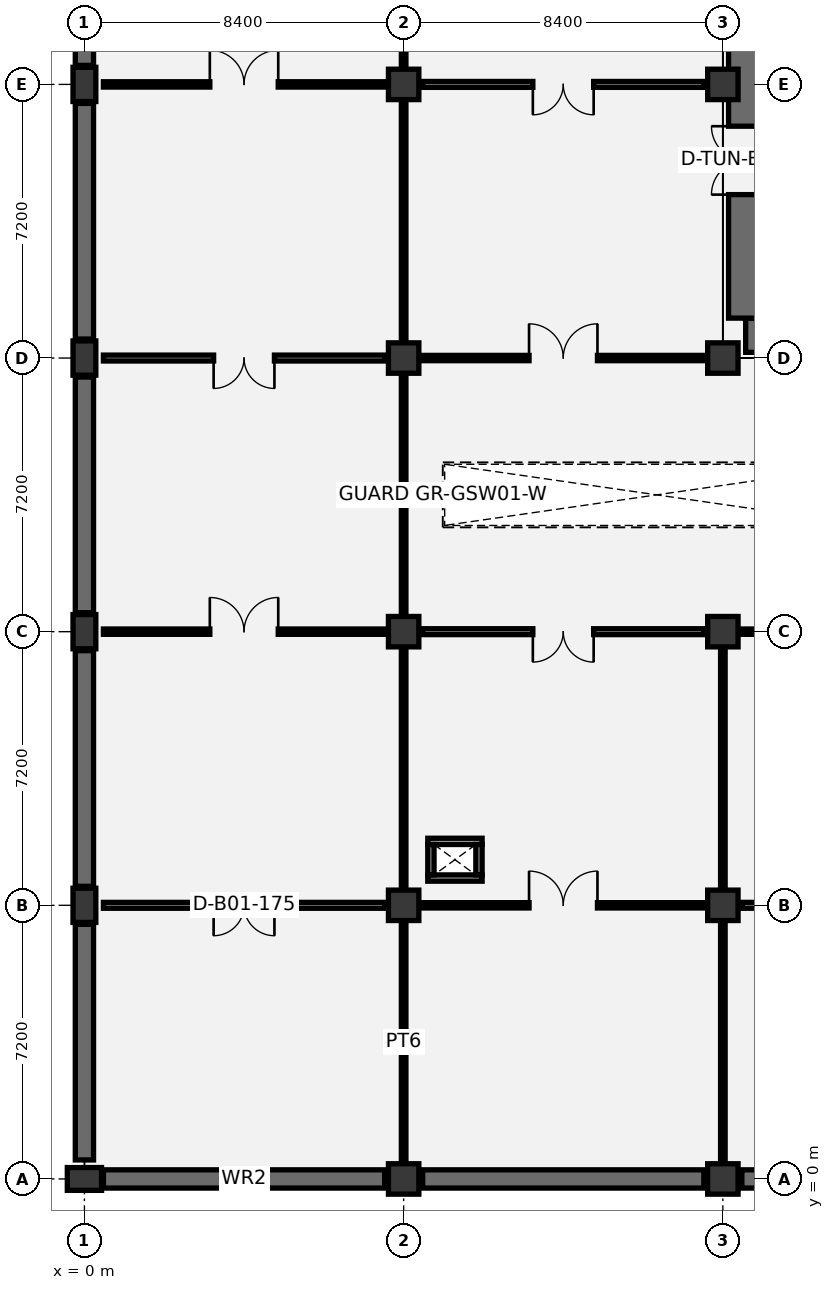
"""IFC4 building model, lengths in metres.
Left out: names, types, materials, properties, quantities, classifications, styles, units other than length and angle.
Written with IfcOpenShell. Run it as: python <this file> out.ifc"""

import sys

from ifc_helpers import new_model, si_unit, direction, frame, frame_2d, origin, origin_2d, place, context, subcontext, project, spatial, rectangle, extrude, element, fill, save


model = new_model("IFC4")
c1 = context("Model", 3, precision=1e-05, world=origin(), true_north=direction((0.0, 1.0)))
c2 = subcontext(c1, "Body", "Model", "MODEL_VIEW")
j1 = project(units=[si_unit("LENGTHUNIT", "METRE"), si_unit("PLANEANGLEUNIT", "RADIAN")], contexts=[c1])
p1 = place(None, origin())
s1 = spatial("IfcSite", under=j1, at=p1, CompositionType="ELEMENT")
p2 = place(p1, origin())
s2 = spatial("IfcBuilding", under=s1, at=p2, CompositionType="ELEMENT")
p3 = place(p2, frame((0.0, 0.0, -4.8)))
s3 = spatial("IfcBuildingStorey", under=s2, at=p3, CompositionType="ELEMENT", Elevation=-4.8)
for number, where, z_axis, x_axis in (
    (1, (0.0, 0.0, 0.0), (0.0, 0.0, 1.0), (0.0, 1.0, 0.0)),
    (2, (0.0, 7.2, 0.0), (0.0, 0.0, 1.0), (1.0, 0.0, 0.0)),
    (3, (0.0, 14.4, 0.0), (0.0, 0.0, 1.0), (1.0, 0.0, 0.0)),
    (4, (0.0, 21.6, 0.0), (0.0, 0.0, 1.0), (1.0, 0.0, 0.0)),
    (5, (0.0, 28.8, 0.0), (0.0, 0.0, 1.0), (1.0, 0.0, 0.0)),
):
    element("IfcColumn", number, at=place(p3, frame(where, z_axis=z_axis, x_axis=x_axis)), inside=s3, PredefinedType="COLUMN", context=c2, shape_type="SweptSolid", body=[
        extrude(rectangle(XDim=0.6, YDim=0.9, at=origin_2d()), origin(), (0.0, 0.0, 1.0), 4.8),
    ])
for number, where, z_axis, x_axis in (
    (6, (8.4, 0.0, 0.0), (0.0, 0.0, 1.0), (1.0, 0.0, 0.0)),
    (7, (8.4, 7.2, 0.0), (0.0, 0.0, 1.0), (1.0, 0.0, 0.0)),
    (8, (8.4, 14.4, 0.0), (0.0, 0.0, 1.0), (1.0, 0.0, 0.0)),
    (9, (8.4, 21.6, 0.0), (0.0, 0.0, 1.0), (1.0, 0.0, 0.0)),
    (10, (8.4, 28.8, 0.0), (0.0, 0.0, 1.0), (1.0, 0.0, 0.0)),
    (11, (16.8, 0.0, 0.0), (0.0, 0.0, 1.0), (1.0, 0.0, 0.0)),
    (12, (16.8, 7.2, 0.0), (0.0, 0.0, 1.0), (1.0, 0.0, 0.0)),
    (13, (16.8, 14.4, 0.0), (0.0, 0.0, 1.0), (1.0, 0.0, 0.0)),
    (14, (16.8, 21.6, 0.0), (0.0, 0.0, 1.0), (1.0, 0.0, 0.0)),
    (15, (16.8, 28.8, 0.0), (0.0, 0.0, 1.0), (1.0, 0.0, 0.0)),
):
    element("IfcColumn", number, at=place(p3, frame(where, z_axis=z_axis, x_axis=x_axis)), inside=s3, PredefinedType="COLUMN", context=c2, shape_type="SweptSolid", body=[
        extrude(rectangle(XDim=0.8, YDim=0.8, at=origin_2d()), origin(), (0.0, 0.0, 1.0), 4.8),
    ])
p4 = place(p3, frame((0.5, 0.0, 0.0), z_axis=(0.0, 0.0, 1.0), x_axis=(1.0, 0.0, 0.0)))
e16 = element("IfcWall", 16, at=p4, inside=s3, PredefinedType="USERDEFINED", context=c2, shape_type="SweptSolid", body=[
    extrude(rectangle(XDim=7.4, YDim=0.48, at=frame_2d((3.7, 0.0))), origin(), (0.0, 0.0, 1.0), 4.45),
])
for number, where, z_axis, x_axis in (
    (17, (0.0, 0.5, 0.0), (0.0, 0.0, 1.0), (0.0, 1.0, 0.0)),
    (18, (0.0, 7.7, 0.0), (0.0, 0.0, 1.0), (0.0, 1.0, 0.0)),
):
    element("IfcWall", number, at=place(p3, frame(where, z_axis=z_axis, x_axis=x_axis)), inside=s3, PredefinedType="USERDEFINED", context=c2, shape_type="SweptSolid", body=[
        extrude(rectangle(XDim=6.2, YDim=0.48, at=frame_2d((3.1, 0.0))), origin(), (0.0, 0.0, 1.0), 4.45),
    ])
p5 = place(p3, frame((0.0, 14.9, 0.0), z_axis=(0.0, 0.0, 1.0), x_axis=(0.0, 1.0, 0.0)))
e19 = element("IfcWall", 19, at=p5, inside=s3, PredefinedType="USERDEFINED", context=c2, shape_type="SweptSolid", body=[
    extrude(rectangle(XDim=6.2, YDim=0.48, at=frame_2d((3.1, 0.0))), origin(), (0.0, 0.0, 1.0), 4.45),
])
for number, where, z_axis, x_axis in (
    (20, (0.0, 22.1, 0.0), (0.0, 0.0, 1.0), (0.0, 1.0, 0.0)),
    (21, (0.0, 29.3, 0.0), (0.0, 0.0, 1.0), (0.0, 1.0, 0.0)),
):
    element("IfcWall", number, at=place(p3, frame(where, z_axis=z_axis, x_axis=x_axis)), inside=s3, PredefinedType="USERDEFINED", context=c2, shape_type="SweptSolid", body=[
        extrude(rectangle(XDim=6.2, YDim=0.48, at=frame_2d((3.1, 0.0))), origin(), (0.0, 0.0, 1.0), 4.45),
    ])
p6 = place(p3, frame((8.9, 0.0, 0.0), z_axis=(0.0, 0.0, 1.0), x_axis=(1.0, 0.0, 0.0)))
e22 = element("IfcWall", 22, at=p6, inside=s3, PredefinedType="USERDEFINED", context=c2, shape_type="SweptSolid", body=[
    extrude(rectangle(XDim=7.4, YDim=0.48, at=frame_2d((3.7, 0.0))), origin(), (0.0, 0.0, 1.0), 4.45),
])
p7 = place(p3, frame((17.3, 0.0, 0.0), z_axis=(0.0, 0.0, 1.0), x_axis=(1.0, 0.0, 0.0)))
e23 = element("IfcWall", 23, at=p7, inside=s3, PredefinedType="USERDEFINED", context=c2, shape_type="SweptSolid", body=[
    extrude(rectangle(XDim=7.4, YDim=0.48, at=frame_2d((3.7, 0.0))), origin(), (0.0, 0.0, 1.0), 4.45),
])
p8 = place(p3, frame((17.4, 22.2, 0.0), z_axis=(0.0, 0.0, 1.0), x_axis=(1.0, 0.0, 0.0)))
e24 = element("IfcWall", 24, at=p8, inside=s3, PredefinedType="SOLIDWALL", context=c2, shape_type="SweptSolid", body=[
    extrude(rectangle(XDim=24.0, YDim=0.9, at=frame_2d((12.0, 0.0))), origin(), (0.0, 0.0, 1.0), 4.8),
])
p9 = place(p8, frame((2.6, 0.0, 0.85)))
e25 = element("IfcOpeningElement", 25, at=p9, cuts=e24, PredefinedType="OPENING", context=c2, shape_type="SweptSolid", body=[
    extrude(rectangle(XDim=5.2, YDim=2.9, at=frame_2d((2.6, 1.45))), frame((0.0, 0.46, 0.0), z_axis=(0.0, -1.0, 0.0), x_axis=(1.0, 0.0, 0.0)), (0.0, 0.0, 1.0), 0.92),
])
p10 = place(p8, frame((14.8, 0.0, 0.85)))
e26 = element("IfcOpeningElement", 26, at=p10, cuts=e24, PredefinedType="OPENING", context=c2, shape_type="SweptSolid", body=[
    extrude(rectangle(XDim=5.2, YDim=2.9, at=frame_2d((2.6, 1.45))), frame((0.0, 0.46, 0.0), z_axis=(0.0, -1.0, 0.0), x_axis=(1.0, 0.0, 0.0)), (0.0, 0.0, 1.0), 0.92),
])
p11 = place(p3, frame((17.4, 22.65, 0.0), z_axis=(0.0, 0.0, 1.0), x_axis=(0.0, 1.0, 0.0)))
e27 = element("IfcWall", 27, at=p11, inside=s3, PredefinedType="SOLIDWALL", context=c2, shape_type="SweptSolid", body=[
    extrude(rectangle(XDim=12.3, YDim=0.9, at=frame_2d((6.15, 0.0))), origin(), (0.0, 0.0, 1.0), 4.8),
])
p12 = place(p11, frame((3.25, 0.0, 0.0)))
e28 = element("IfcOpeningElement", 28, at=p12, cuts=e27, PredefinedType="OPENING", context=c2, shape_type="SweptSolid", body=[
    extrude(rectangle(XDim=1.8, YDim=2.2, at=frame_2d((0.9, 1.1))), frame((0.0, 0.46, 0.0), z_axis=(0.0, -1.0, 0.0), x_axis=(1.0, 0.0, 0.0)), (0.0, 0.0, 1.0), 0.92),
])
for number, where, z_axis, x_axis in (
    (29, (9.035, 7.917, 0.0), (0.0, 0.0, 1.0), (1.0, 0.0, 0.0)),
    (30, (9.035, 8.883, 0.0), (0.0, 0.0, 1.0), (1.0, 0.0, 0.0)),
):
    element("IfcWall", number, at=place(p3, frame(where, z_axis=z_axis, x_axis=x_axis)), inside=s3, PredefinedType="PARTITIONING", context=c2, shape_type="SweptSolid", body=[
        extrude(rectangle(XDim=1.43, YDim=0.165, at=frame_2d((0.715, 0.0))), origin(), (0.0, 0.0, 1.0), 4.45),
    ])
for number, where, z_axis, x_axis in (
    (31, (9.117, 8.0, 0.0), (0.0, 0.0, 1.0), (0.0, 1.0, 0.0)),
    (32, (10.383, 8.0, 0.0), (0.0, 0.0, 1.0), (0.0, 1.0, 0.0)),
):
    element("IfcWall", number, at=place(p3, frame(where, z_axis=z_axis, x_axis=x_axis)), inside=s3, PredefinedType="PARTITIONING", context=c2, shape_type="SweptSolid", body=[
        extrude(rectangle(XDim=0.8, YDim=0.165, at=frame_2d((0.4, 0.0))), origin(), (0.0, 0.0, 1.0), 4.45),
    ])
p13 = place(p3, frame((8.4, 0.5, 0.0), z_axis=(0.0, 0.0, 1.0), x_axis=(0.0, 1.0, 0.0)))
e33 = element("IfcWall", 33, at=p13, inside=s3, PredefinedType="PARTITIONING", context=c2, shape_type="SweptSolid", body=[
    extrude(rectangle(XDim=6.2, YDim=0.12, at=frame_2d((3.1, 0.0))), origin(), (0.0, 0.0, 1.0), 3.645),
])
p14 = place(p3, frame((0.5, 7.2, 0.0), z_axis=(0.0, 0.0, 1.0), x_axis=(1.0, 0.0, 0.0)))
e34 = element("IfcWall", 34, at=p14, inside=s3, PredefinedType="PARTITIONING", context=c2, shape_type="SweptSolid", body=[
    extrude(rectangle(XDim=7.4, YDim=0.155, at=frame_2d((3.7, 0.0))), origin(), (0.0, 0.0, 1.0), 3.545),
])
p15 = place(p14, frame((2.9, 0.0, 0.0)))
e35 = element("IfcOpeningElement", 35, at=p15, cuts=e34, PredefinedType="OPENING", context=c2, shape_type="SweptSolid", body=[
    extrude(rectangle(XDim=1.6, YDim=2.2, at=frame_2d((0.8, 1.1))), frame((0.0, 0.087, 0.0), z_axis=(0.0, -1.0, 0.0), x_axis=(1.0, 0.0, 0.0)), (0.0, 0.0, 1.0), 0.175),
])
p16 = place(p3, frame((8.4, 7.7, 0.0), z_axis=(0.0, 0.0, 1.0), x_axis=(0.0, 1.0, 0.0)))
e36 = element("IfcWall", 36, at=p16, inside=s3, PredefinedType="PARTITIONING", context=c2, shape_type="SweptSolid", body=[
    extrude(rectangle(XDim=6.2, YDim=0.12, at=frame_2d((3.1, 0.0))), origin(), (0.0, 0.0, 1.0), 3.645),
])
p17 = place(p3, frame((0.5, 14.4, 0.0), z_axis=(0.0, 0.0, 1.0), x_axis=(1.0, 0.0, 0.0)))
e37 = element("IfcWall", 37, at=p17, inside=s3, PredefinedType="PARTITIONING", context=c2, shape_type="SweptSolid", body=[
    extrude(rectangle(XDim=7.4, YDim=0.14, at=frame_2d((3.7, 0.0))), origin(), (0.0, 0.0, 1.0), 3.545),
])
p18 = place(p17, frame((2.8, 0.0, 0.0)))
e38 = element("IfcOpeningElement", 38, at=p18, cuts=e37, PredefinedType="OPENING", context=c2, shape_type="SweptSolid", body=[
    extrude(rectangle(XDim=1.8, YDim=2.25, at=frame_2d((0.9, 1.125))), frame((0.0, 0.08, 0.0), z_axis=(0.0, -1.0, 0.0), x_axis=(1.0, 0.0, 0.0)), (0.0, 0.0, 1.0), 0.16),
])
p19 = place(p3, frame((8.4, 14.9, 0.0), z_axis=(0.0, 0.0, 1.0), x_axis=(0.0, 1.0, 0.0)))
e39 = element("IfcWall", 39, at=p19, inside=s3, PredefinedType="PARTITIONING", context=c2, shape_type="SweptSolid", body=[
    extrude(rectangle(XDim=6.2, YDim=0.12, at=frame_2d((3.1, 0.0))), origin(), (0.0, 0.0, 1.0), 3.645),
])
p20 = place(p3, frame((0.5, 21.6, 0.0), z_axis=(0.0, 0.0, 1.0), x_axis=(1.0, 0.0, 0.0)))
e40 = element("IfcWall", 40, at=p20, inside=s3, PredefinedType="PARTITIONING", context=c2, shape_type="SweptSolid", body=[
    extrude(rectangle(XDim=7.4, YDim=0.155, at=frame_2d((3.7, 0.0))), origin(), (0.0, 0.0, 1.0), 3.545),
])
p21 = place(p20, frame((2.9, 0.0, 0.0)))
e41 = element("IfcOpeningElement", 41, at=p21, cuts=e40, PredefinedType="OPENING", context=c2, shape_type="SweptSolid", body=[
    extrude(rectangle(XDim=1.6, YDim=2.2, at=frame_2d((0.8, 1.1))), frame((0.0, 0.087, 0.0), z_axis=(0.0, -1.0, 0.0), x_axis=(1.0, 0.0, 0.0)), (0.0, 0.0, 1.0), 0.175),
])
p22 = place(p3, frame((8.4, 22.1, 0.0), z_axis=(0.0, 0.0, 1.0), x_axis=(0.0, 1.0, 0.0)))
e42 = element("IfcWall", 42, at=p22, inside=s3, PredefinedType="PARTITIONING", context=c2, shape_type="SweptSolid", body=[
    extrude(rectangle(XDim=6.2, YDim=0.12, at=frame_2d((3.1, 0.0))), origin(), (0.0, 0.0, 1.0), 3.645),
])
p23 = place(p3, frame((0.5, 28.8, 0.0), z_axis=(0.0, 0.0, 1.0), x_axis=(1.0, 0.0, 0.0)))
e43 = element("IfcWall", 43, at=p23, inside=s3, PredefinedType="PARTITIONING", context=c2, shape_type="SweptSolid", body=[
    extrude(rectangle(XDim=7.4, YDim=0.14, at=frame_2d((3.7, 0.0))), origin(), (0.0, 0.0, 1.0), 3.545),
])
p24 = place(p23, frame((2.8, 0.0, 0.0)))
e44 = element("IfcOpeningElement", 44, at=p24, cuts=e43, PredefinedType="OPENING", context=c2, shape_type="SweptSolid", body=[
    extrude(rectangle(XDim=1.8, YDim=2.25, at=frame_2d((0.9, 1.125))), frame((0.0, 0.08, 0.0), z_axis=(0.0, -1.0, 0.0), x_axis=(1.0, 0.0, 0.0)), (0.0, 0.0, 1.0), 0.16),
])
for number, where, z_axis, x_axis in (
    (45, (8.4, 29.3, 0.0), (0.0, 0.0, 1.0), (0.0, 1.0, 0.0)),
    (46, (16.8, 0.5, 0.0), (0.0, 0.0, 1.0), (0.0, 1.0, 0.0)),
):
    element("IfcWall", number, at=place(p3, frame(where, z_axis=z_axis, x_axis=x_axis)), inside=s3, PredefinedType="PARTITIONING", context=c2, shape_type="SweptSolid", body=[
        extrude(rectangle(XDim=6.2, YDim=0.12, at=frame_2d((3.1, 0.0))), origin(), (0.0, 0.0, 1.0), 3.645),
    ])
p25 = place(p3, frame((8.9, 7.2, 0.0), z_axis=(0.0, 0.0, 1.0), x_axis=(1.0, 0.0, 0.0)))
e47 = element("IfcWall", 47, at=p25, inside=s3, PredefinedType="PARTITIONING", context=c2, shape_type="SweptSolid", body=[
    extrude(rectangle(XDim=7.4, YDim=0.14, at=frame_2d((3.7, 0.0))), origin(), (0.0, 0.0, 1.0), 3.545),
])
p26 = place(p25, frame((2.8, 0.0, 0.0)))
e48 = element("IfcOpeningElement", 48, at=p26, cuts=e47, PredefinedType="OPENING", context=c2, shape_type="SweptSolid", body=[
    extrude(rectangle(XDim=1.8, YDim=2.25, at=frame_2d((0.9, 1.125))), frame((0.0, 0.08, 0.0), z_axis=(0.0, -1.0, 0.0), x_axis=(1.0, 0.0, 0.0)), (0.0, 0.0, 1.0), 0.16),
])
p27 = place(p3, frame((16.8, 7.7, 0.0), z_axis=(0.0, 0.0, 1.0), x_axis=(0.0, 1.0, 0.0)))
e49 = element("IfcWall", 49, at=p27, inside=s3, PredefinedType="PARTITIONING", context=c2, shape_type="SweptSolid", body=[
    extrude(rectangle(XDim=6.2, YDim=0.12, at=frame_2d((3.1, 0.0))), origin(), (0.0, 0.0, 1.0), 3.645),
])
p28 = place(p3, frame((8.9, 14.4, 0.0), z_axis=(0.0, 0.0, 1.0), x_axis=(1.0, 0.0, 0.0)))
e50 = element("IfcWall", 50, at=p28, inside=s3, PredefinedType="PARTITIONING", context=c2, shape_type="SweptSolid", body=[
    extrude(rectangle(XDim=7.4, YDim=0.155, at=frame_2d((3.7, 0.0))), origin(), (0.0, 0.0, 1.0), 3.545),
])
p29 = place(p28, frame((2.9, 0.0, 0.0)))
e51 = element("IfcOpeningElement", 51, at=p29, cuts=e50, PredefinedType="OPENING", context=c2, shape_type="SweptSolid", body=[
    extrude(rectangle(XDim=1.6, YDim=2.2, at=frame_2d((0.8, 1.1))), frame((0.0, 0.087, 0.0), z_axis=(0.0, -1.0, 0.0), x_axis=(1.0, 0.0, 0.0)), (0.0, 0.0, 1.0), 0.175),
])
p30 = place(p3, frame((8.9, 21.6, 0.0), z_axis=(0.0, 0.0, 1.0), x_axis=(1.0, 0.0, 0.0)))
e52 = element("IfcWall", 52, at=p30, inside=s3, PredefinedType="PARTITIONING", context=c2, shape_type="SweptSolid", body=[
    extrude(rectangle(XDim=7.4, YDim=0.14, at=frame_2d((3.7, 0.0))), origin(), (0.0, 0.0, 1.0), 3.545),
])
p31 = place(p30, frame((2.8, 0.0, 0.0)))
e53 = element("IfcOpeningElement", 53, at=p31, cuts=e52, PredefinedType="OPENING", context=c2, shape_type="SweptSolid", body=[
    extrude(rectangle(XDim=1.8, YDim=2.25, at=frame_2d((0.9, 1.125))), frame((0.0, 0.08, 0.0), z_axis=(0.0, -1.0, 0.0), x_axis=(1.0, 0.0, 0.0)), (0.0, 0.0, 1.0), 0.16),
])
p32 = place(p3, frame((8.9, 28.8, 0.0), z_axis=(0.0, 0.0, 1.0), x_axis=(1.0, 0.0, 0.0)))
e54 = element("IfcWall", 54, at=p32, inside=s3, PredefinedType="PARTITIONING", context=c2, shape_type="SweptSolid", body=[
    extrude(rectangle(XDim=7.4, YDim=0.155, at=frame_2d((3.7, 0.0))), origin(), (0.0, 0.0, 1.0), 3.545),
])
p33 = place(p32, frame((2.9, 0.0, 0.0)))
e55 = element("IfcOpeningElement", 55, at=p33, cuts=e54, PredefinedType="OPENING", context=c2, shape_type="SweptSolid", body=[
    extrude(rectangle(XDim=1.6, YDim=2.2, at=frame_2d((0.8, 1.1))), frame((0.0, 0.087, 0.0), z_axis=(0.0, -1.0, 0.0), x_axis=(1.0, 0.0, 0.0)), (0.0, 0.0, 1.0), 0.175),
])
p34 = place(p3, frame((17.3, 7.2, 0.0), z_axis=(0.0, 0.0, 1.0), x_axis=(1.0, 0.0, 0.0)))
e56 = element("IfcWall", 56, at=p34, inside=s3, PredefinedType="PARTITIONING", context=c2, shape_type="SweptSolid", body=[
    extrude(rectangle(XDim=7.4, YDim=0.155, at=frame_2d((3.7, 0.0))), origin(), (0.0, 0.0, 1.0), 3.545),
])
p35 = place(p34, frame((2.9, 0.0, 0.0)))
e57 = element("IfcOpeningElement", 57, at=p35, cuts=e56, PredefinedType="OPENING", context=c2, shape_type="SweptSolid", body=[
    extrude(rectangle(XDim=1.6, YDim=2.2, at=frame_2d((0.8, 1.1))), frame((0.0, 0.087, 0.0), z_axis=(0.0, -1.0, 0.0), x_axis=(1.0, 0.0, 0.0)), (0.0, 0.0, 1.0), 0.175),
])
p36 = place(p3, frame((17.3, 14.4, 0.0), z_axis=(0.0, 0.0, 1.0), x_axis=(1.0, 0.0, 0.0)))
e58 = element("IfcWall", 58, at=p36, inside=s3, PredefinedType="PARTITIONING", context=c2, shape_type="SweptSolid", body=[
    extrude(rectangle(XDim=7.4, YDim=0.14, at=frame_2d((3.7, 0.0))), origin(), (0.0, 0.0, 1.0), 3.545),
])
p37 = place(p36, frame((2.8, 0.0, 0.0)))
e59 = element("IfcOpeningElement", 59, at=p37, cuts=e58, PredefinedType="OPENING", context=c2, shape_type="SweptSolid", body=[
    extrude(rectangle(XDim=1.8, YDim=2.25, at=frame_2d((0.9, 1.125))), frame((0.0, 0.08, 0.0), z_axis=(0.0, -1.0, 0.0), x_axis=(1.0, 0.0, 0.0)), (0.0, 0.0, 1.0), 0.16),
])
p38 = place(p12, origin())
e60 = element("IfcDoor", 60, at=p38, inside=s3, OperationType="DOUBLE_DOOR_SINGLE_SWING", PredefinedType="DOOR", context=c2, shape_type="SweptSolid", body=[
    extrude(rectangle(XDim=1.8, YDim=2.2, at=frame_2d((0.9, 1.1))), frame((0.0, 0.025, 0.0), z_axis=(0.0, -1.0, 0.0), x_axis=(1.0, 0.0, 0.0)), (0.0, 0.0, 1.0), 0.05),
])
fill(e28, e60)
p39 = place(p15, frame((1.6, 0.0, 0.0), z_axis=(0.0, 0.0, 1.0), x_axis=(-1.0, 0.0, 0.0)))
e61 = element("IfcDoor", 61, at=p39, inside=s3, OperationType="DOUBLE_DOOR_SINGLE_SWING", PredefinedType="DOOR", context=c2, shape_type="SweptSolid", body=[
    extrude(rectangle(XDim=1.6, YDim=2.2, at=frame_2d((0.8, 1.1))), frame((0.0, 0.025, 0.0), z_axis=(0.0, -1.0, 0.0), x_axis=(1.0, 0.0, 0.0)), (0.0, 0.0, 1.0), 0.05),
])
fill(e35, e61)
p40 = place(p18, origin())
e62 = element("IfcDoor", 62, at=p40, inside=s3, OperationType="DOUBLE_DOOR_SINGLE_SWING", PredefinedType="DOOR", context=c2, shape_type="SweptSolid", body=[
    extrude(rectangle(XDim=1.8, YDim=2.25, at=frame_2d((0.9, 1.125))), frame((0.0, 0.025, 0.0), z_axis=(0.0, -1.0, 0.0), x_axis=(1.0, 0.0, 0.0)), (0.0, 0.0, 1.0), 0.05),
])
fill(e38, e62)
p41 = place(p21, frame((1.6, 0.0, 0.0), z_axis=(0.0, 0.0, 1.0), x_axis=(-1.0, 0.0, 0.0)))
e63 = element("IfcDoor", 63, at=p41, inside=s3, OperationType="DOUBLE_DOOR_SINGLE_SWING", PredefinedType="DOOR", context=c2, shape_type="SweptSolid", body=[
    extrude(rectangle(XDim=1.6, YDim=2.2, at=frame_2d((0.8, 1.1))), frame((0.0, 0.025, 0.0), z_axis=(0.0, -1.0, 0.0), x_axis=(1.0, 0.0, 0.0)), (0.0, 0.0, 1.0), 0.05),
])
fill(e41, e63)
p42 = place(p24, origin())
e64 = element("IfcDoor", 64, at=p42, inside=s3, OperationType="DOUBLE_DOOR_SINGLE_SWING", PredefinedType="DOOR", context=c2, shape_type="SweptSolid", body=[
    extrude(rectangle(XDim=1.8, YDim=2.25, at=frame_2d((0.9, 1.125))), frame((0.0, 0.025, 0.0), z_axis=(0.0, -1.0, 0.0), x_axis=(1.0, 0.0, 0.0)), (0.0, 0.0, 1.0), 0.05),
])
fill(e44, e64)
p43 = place(p26, origin())
e65 = element("IfcDoor", 65, at=p43, inside=s3, OperationType="DOUBLE_DOOR_SINGLE_SWING", PredefinedType="DOOR", context=c2, shape_type="SweptSolid", body=[
    extrude(rectangle(XDim=1.8, YDim=2.25, at=frame_2d((0.9, 1.125))), frame((0.0, 0.025, 0.0), z_axis=(0.0, -1.0, 0.0), x_axis=(1.0, 0.0, 0.0)), (0.0, 0.0, 1.0), 0.05),
])
fill(e48, e65)
p44 = place(p29, frame((1.6, 0.0, 0.0), z_axis=(0.0, 0.0, 1.0), x_axis=(-1.0, 0.0, 0.0)))
e66 = element("IfcDoor", 66, at=p44, inside=s3, OperationType="DOUBLE_DOOR_SINGLE_SWING", PredefinedType="DOOR", context=c2, shape_type="SweptSolid", body=[
    extrude(rectangle(XDim=1.6, YDim=2.2, at=frame_2d((0.8, 1.1))), frame((0.0, 0.025, 0.0), z_axis=(0.0, -1.0, 0.0), x_axis=(1.0, 0.0, 0.0)), (0.0, 0.0, 1.0), 0.05),
])
fill(e51, e66)
p45 = place(p31, origin())
e67 = element("IfcDoor", 67, at=p45, inside=s3, OperationType="DOUBLE_DOOR_SINGLE_SWING", PredefinedType="DOOR", context=c2, shape_type="SweptSolid", body=[
    extrude(rectangle(XDim=1.8, YDim=2.25, at=frame_2d((0.9, 1.125))), frame((0.0, 0.025, 0.0), z_axis=(0.0, -1.0, 0.0), x_axis=(1.0, 0.0, 0.0)), (0.0, 0.0, 1.0), 0.05),
])
fill(e53, e67)
p46 = place(p33, frame((1.6, 0.0, 0.0), z_axis=(0.0, 0.0, 1.0), x_axis=(-1.0, 0.0, 0.0)))
e68 = element("IfcDoor", 68, at=p46, inside=s3, OperationType="DOUBLE_DOOR_SINGLE_SWING", PredefinedType="DOOR", context=c2, shape_type="SweptSolid", body=[
    extrude(rectangle(XDim=1.6, YDim=2.2, at=frame_2d((0.8, 1.1))), frame((0.0, 0.025, 0.0), z_axis=(0.0, -1.0, 0.0), x_axis=(1.0, 0.0, 0.0)), (0.0, 0.0, 1.0), 0.05),
])
fill(e55, e68)
save(model, sys.argv[1])
